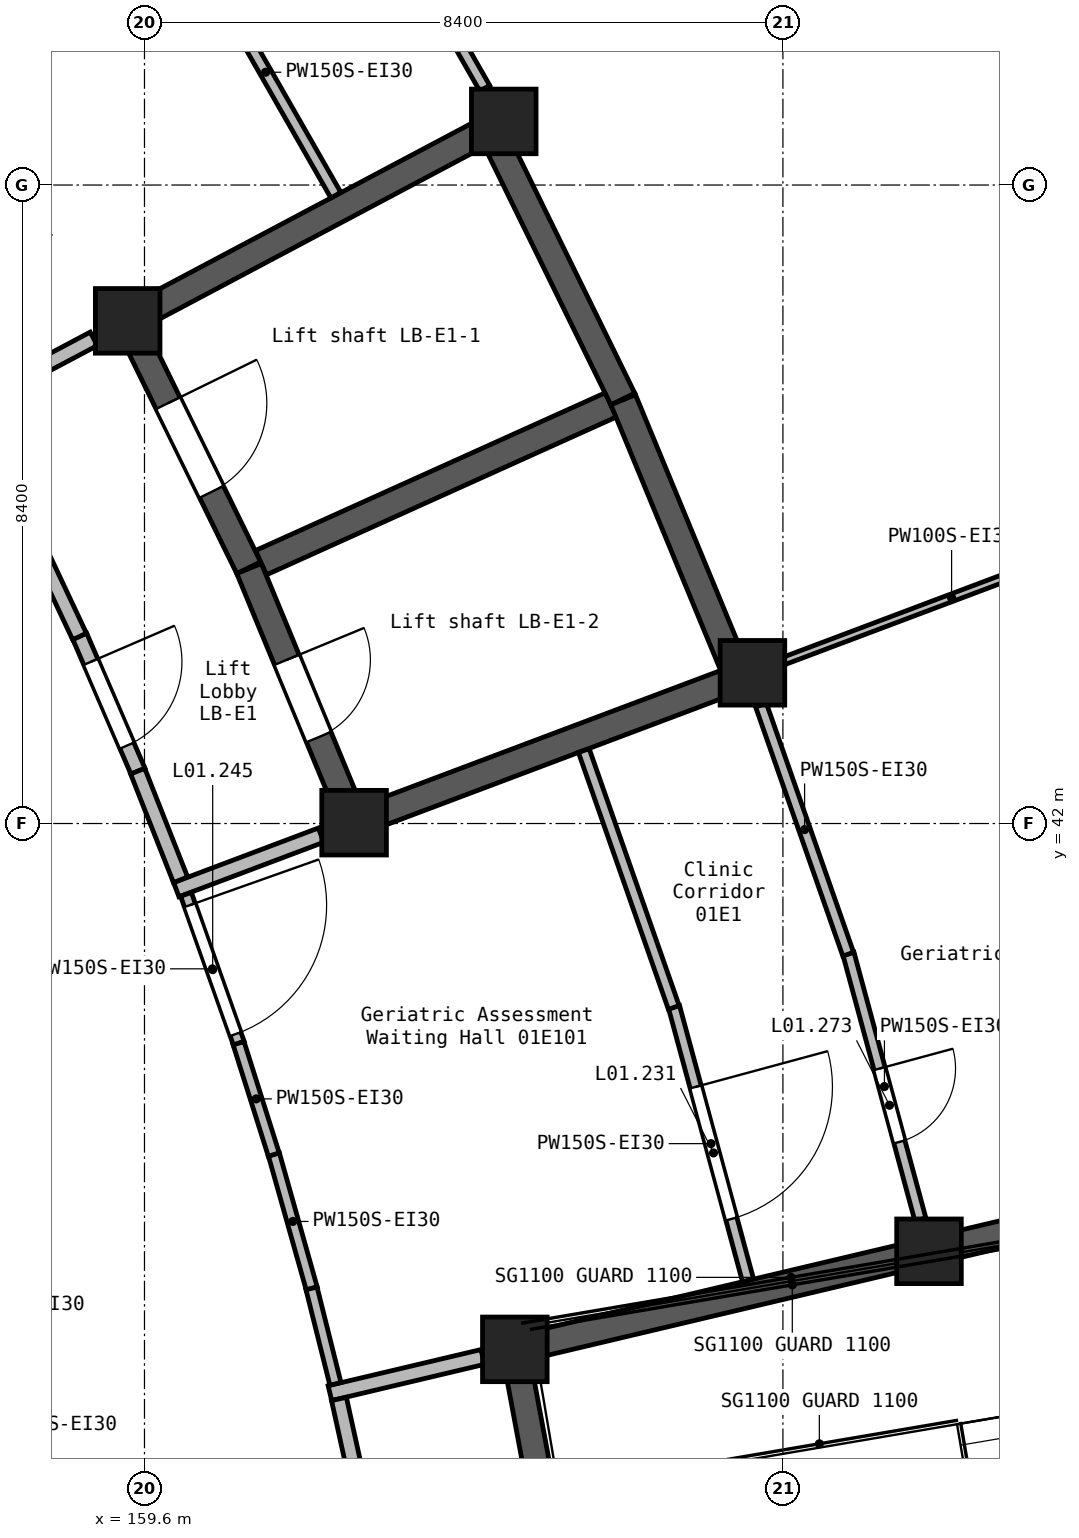
"""IFC4 building model, lengths in metres.
Left out: names, types, materials, properties, quantities, classifications, styles, units other than length and angle.
Written with IfcOpenShell. Run it as: python <this file> out.ifc"""

import sys

from ifc_helpers import new_model, si_unit, direction, frame, frame_2d, origin, origin_2d, place, context, subcontext, project, spatial, rectangle, extrude, element, fill, save


model = new_model("IFC4")
c1 = context("Model", 3, precision=1e-05, world=origin(), true_north=direction((0.0, 1.0)))
c2 = subcontext(c1, "Body", "Model", "MODEL_VIEW")
j1 = project(units=[si_unit("LENGTHUNIT", "METRE"), si_unit("PLANEANGLEUNIT", "RADIAN")], contexts=[c1])
p1 = place(None, origin())
s1 = spatial("IfcSite", under=j1, at=p1, CompositionType="ELEMENT")
p2 = place(p1, origin())
s2 = spatial("IfcBuilding", under=s1, at=p2, CompositionType="ELEMENT")
p3 = place(p2, frame((0.0, 0.0, 5.4)))
s3 = spatial("IfcBuildingStorey", under=s2, at=p3, CompositionType="ELEMENT", Elevation=5.4)
for number, where, z_axis, x_axis in (
    (1, (159.379, 48.613, 0.0), (0.0, 0.0, 1.0), (1.0, 0.0, 0.0)),
    (2, (162.358, 42.011, 0.0), (0.0, 0.0, 1.0), (1.0, 0.0, 0.0)),
    (3, (164.327, 51.237, 0.0), (0.0, 0.0, 1.0), (1.0, 0.0, 0.0)),
    (4, (164.473, 35.082, 0.0), (0.0, 0.0, 1.0), (1.0, 0.0, 0.0)),
    (5, (167.599, 43.983, 0.0), (0.0, 0.0, 1.0), (1.0, 0.0, 0.0)),
    (6, (169.922, 36.372, 0.0), (0.0, 0.0, 1.0), (1.0, 0.0, 0.0)),
):
    element("IfcColumn", number, at=place(p3, frame(where, z_axis=z_axis, x_axis=x_axis)), inside=s3, PredefinedType="COLUMN", context=c2, shape_type="SweptSolid", body=[
        extrude(rectangle(XDim=0.85, YDim=0.85, at=origin_2d()), origin(), (0.0, 0.0, 1.0), 4.5),
    ])
p4 = place(p3, frame((159.224, 48.531, 0.0), z_axis=(0.0, 0.0, 1.0), x_axis=(0.883393138637, 0.468632652094, 0.0)))
e7 = element("IfcWall", 7, at=p4, inside=s3, PredefinedType="SHEAR", context=c2, shape_type="SweptSolid", body=[
    extrude(rectangle(XDim=5.751, YDim=0.35, at=frame_2d((2.875, 0.0))), origin(), (0.0, 0.0, 1.0), 4.5),
])
p5 = place(p3, frame((159.456, 48.456, 0.0), z_axis=(0.0, 0.0, 1.0), x_axis=(0.440221126053, -0.89788939195, 0.0)))
e8 = element("IfcWall", 8, at=p5, inside=s3, PredefinedType="SHEAR", context=c2, shape_type="SweptSolid", body=[
    extrude(rectangle(XDim=3.442, YDim=0.35, at=frame_2d((1.721, 0.0))), origin(), (0.0, 0.0, 1.0), 4.5),
])
p6 = place(p5, frame((1.031, 0.0, 0.0)))
e9 = element("IfcOpeningElement", 9, at=p6, cuts=e8, PredefinedType="OPENING", context=c2, shape_type="SweptSolid", body=[
    extrude(rectangle(XDim=1.3, YDim=2.1, at=frame_2d((0.65, 1.05))), frame((0.0, 0.185, 0.0), z_axis=(0.0, -1.0, 0.0), x_axis=(1.0, 0.0, 0.0)), (0.0, 0.0, 1.0), 0.37),
])
p7 = place(p3, frame((160.976, 45.355, 0.0), z_axis=(0.0, 0.0, 1.0), x_axis=(0.381990591944, -0.924166212143, 0.0)))
e10 = element("IfcWall", 10, at=p7, inside=s3, PredefinedType="SHEAR", context=c2, shape_type="SweptSolid", body=[
    extrude(rectangle(XDim=3.443, YDim=0.35, at=frame_2d((1.721, 0.0))), origin(), (0.0, 0.0, 1.0), 4.5),
])
p8 = place(p7, frame((1.3, 0.0, 0.0)))
e11 = element("IfcOpeningElement", 11, at=p8, cuts=e10, PredefinedType="OPENING", context=c2, shape_type="SweptSolid", body=[
    extrude(rectangle(XDim=1.1, YDim=2.1, at=frame_2d((0.55, 1.05))), frame((0.0, 0.185, 0.0), z_axis=(0.0, -1.0, 0.0), x_axis=(1.0, 0.0, 0.0)), (0.0, 0.0, 1.0), 0.37),
])
p9 = place(p3, frame((161.134, 45.432, 0.0), z_axis=(0.0, 0.0, 1.0), x_axis=(0.911564728385, 0.411156595427, 0.0)))
e12 = element("IfcWall", 12, at=p9, inside=s3, PredefinedType="SHEAR", context=c2, shape_type="SweptSolid", body=[
    extrude(rectangle(XDim=5.05, YDim=0.35, at=frame_2d((2.525, 0.0))), origin(), (0.0, 0.0, 1.0), 4.5),
])
p10 = place(p3, frame((162.194, 41.949, 0.0), z_axis=(0.0, 0.0, 1.0), x_axis=(0.935920223106, 0.352212061095, 0.0)))
e13 = element("IfcWall", 13, at=p10, inside=s3, PredefinedType="SHEAR", context=c2, shape_type="SweptSolid", body=[
    extrude(rectangle(XDim=5.75, YDim=0.35, at=frame_2d((2.875, 0.0))), origin(), (0.0, 0.0, 1.0), 4.5),
])
p11 = place(p3, frame((164.303, 35.042, 0.0), z_axis=(0.0, 0.0, 1.0), x_axis=(0.973093454504, 0.230410782737, 0.0)))
e14 = element("IfcWall", 14, at=p11, inside=s3, PredefinedType="SHEAR", context=c2, shape_type="SweptSolid", body=[
    extrude(rectangle(XDim=7.55, YDim=0.35, at=frame_2d((3.775, 0.0))), origin(), (0.0, 0.0, 1.0), 4.5),
])
p12 = place(p3, frame((165.469, 29.746, 0.0), z_axis=(0.0, 0.0, 1.0), x_axis=(-0.183471964923, 0.98302494276, 0.0)))
e15 = element("IfcWall", 15, at=p12, inside=s3, PredefinedType="SHEAR", context=c2, shape_type="SweptSolid", body=[
    extrude(rectangle(XDim=5.253, YDim=0.35, at=frame_2d((2.627, 0.0))), origin(), (0.0, 0.0, 1.0), 4.5),
])
p13 = place(p3, frame((165.894, 47.585, 0.0), z_axis=(0.0, 0.0, 1.0), x_axis=(-0.43992897418, 0.898032570499, 0.0)))
e16 = element("IfcWall", 16, at=p13, inside=s3, PredefinedType="SHEAR", context=c2, shape_type="SweptSolid", body=[
    extrude(rectangle(XDim=3.788, YDim=0.35, at=frame_2d((1.894, 0.0))), origin(), (0.0, 0.0, 1.0), 4.5),
])
p14 = place(p3, frame((167.345, 44.075, 0.0), z_axis=(0.0, 0.0, 1.0), x_axis=(-0.382046231428, 0.924143212415, 0.0)))
e17 = element("IfcWall", 17, at=p14, inside=s3, PredefinedType="SHEAR", context=c2, shape_type="SweptSolid", body=[
    extrude(rectangle(XDim=3.788, YDim=0.35, at=frame_2d((1.894, 0.0))), origin(), (0.0, 0.0, 1.0), 4.5),
])
p15 = place(p3, frame((162.04, 34.506, 0.0), z_axis=(0.0, 0.0, 1.0), x_axis=(0.973117236519, 0.230310321066, 0.0)))
e18 = element("IfcWall", 18, at=p15, inside=s3, PredefinedType="SOLIDWALL", context=c2, shape_type="SweptSolid", body=[
    extrude(rectangle(XDim=2.066, YDim=0.2, at=frame_2d((1.033, 0.0))), origin(), (0.0, 0.0, 1.0), 4.15),
])
p16 = place(p3, frame((160.018, 41.13, 0.0), z_axis=(0.0, 0.0, 1.0), x_axis=(0.935835444075, 0.352437259115, 0.0)))
e19 = element("IfcWall", 19, at=p16, inside=s3, PredefinedType="SOLIDWALL", context=c2, shape_type="SweptSolid", body=[
    extrude(rectangle(XDim=2.036, YDim=0.2, at=frame_2d((1.018, 0.0))), origin(), (0.0, 0.0, 1.0), 4.15),
])
p17 = place(p3, frame((157.171, 47.442, 0.0), z_axis=(0.0, 0.0, 1.0), x_axis=(0.883475149074, 0.468478026133, 0.0)))
e20 = element("IfcWall", 20, at=p17, inside=s3, PredefinedType="SOLIDWALL", context=c2, shape_type="SweptSolid", body=[
    extrude(rectangle(XDim=1.995, YDim=0.2, at=frame_2d((0.998, 0.0))), origin(), (0.0, 0.0, 1.0), 4.15),
])
p18 = place(p3, frame((158.747, 44.465, 0.0), z_axis=(0.0, 0.0, 1.0), x_axis=(0.396322487651, -0.918111368943, 0.0)))
e21 = element("IfcWall", 21, at=p18, inside=s3, PredefinedType="SOLIDWALL", context=c2, shape_type="SweptSolid", body=[
    extrude(rectangle(XDim=1.936, YDim=0.2, at=frame_2d((0.968, 0.0))), origin(), (0.0, 0.0, 1.0), 4.15),
])
p19 = place(p18, frame((0.368, 0.0, 0.0)))
e22 = element("IfcOpeningElement", 22, at=p19, cuts=e21, PredefinedType="OPENING", context=c2, shape_type="SweptSolid", body=[
    extrude(rectangle(XDim=1.2, YDim=2.1, at=frame_2d((0.6, 1.05))), frame((0.0, 0.11, 0.0), z_axis=(0.0, -1.0, 0.0), x_axis=(1.0, 0.0, 0.0)), (0.0, 0.0, 1.0), 0.22),
])
p20 = place(p3, frame((162.159, 34.43, 0.0), z_axis=(0.0, 0.0, 1.0), x_axis=(0.215079958229, -0.976596442533, 0.0)))
e23 = element("IfcWall", 23, at=p20, inside=s3, PredefinedType="SOLIDWALL", context=c2, shape_type="SweptSolid", body=[
    extrude(rectangle(XDim=1.537, YDim=0.2, at=frame_2d((0.769, 0.0))), origin(), (0.0, 0.0, 1.0), 4.15),
])
p21 = place(p3, frame((158.089, 45.855, 0.0), z_axis=(0.0, 0.0, 1.0), x_axis=(0.42579703633, -0.904818702201, 0.0)))
e24 = element("IfcWall", 24, at=p21, inside=s3, PredefinedType="SOLIDWALL", context=c2, shape_type="SweptSolid", body=[
    extrude(rectangle(XDim=1.541, YDim=0.2, at=frame_2d((0.771, 0.0))), origin(), (0.0, 0.0, 1.0), 4.15),
])
p22 = place(p3, frame((159.51, 42.689, 0.0), z_axis=(0.0, 0.0, 1.0), x_axis=(0.367195475631, -0.930143796773, 0.0)))
e25 = element("IfcWall", 25, at=p22, inside=s3, PredefinedType="SOLIDWALL", context=c2, shape_type="SweptSolid", body=[
    extrude(rectangle(XDim=1.537, YDim=0.2, at=frame_2d((0.768, 0.0))), origin(), (0.0, 0.0, 1.0), 4.15),
])
p23 = place(p3, frame((162.313, 54.758, 0.0), z_axis=(0.0, 0.0, 1.0), x_axis=(0.496582798362, -0.867989357291, 0.0)))
e26 = element("IfcWall", 26, at=p23, inside=s3, PredefinedType="PARTITIONING", context=c2, shape_type="SweptSolid", body=[
    extrude(rectangle(XDim=3.553, YDim=0.15, at=frame_2d((1.777, 0.0))), origin(), (0.0, 0.0, 1.0), 4.15),
])
p24 = place(p23, frame((1.566, 0.0, 0.0)))
e27 = element("IfcOpeningElement", 27, at=p24, cuts=e26, PredefinedType="OPENING", context=c2, shape_type="SweptSolid", body=[
    extrude(rectangle(XDim=1.0, YDim=2.1, at=frame_2d((0.5, 1.05))), frame((0.0, 0.085, 0.0), z_axis=(0.0, -1.0, 0.0), x_axis=(1.0, 0.0, 0.0)), (0.0, 0.0, 1.0), 0.17),
])
p25 = place(p3, frame((168.862, 40.287, 0.0), z_axis=(0.0, 0.0, 1.0), x_axis=(0.261268938462, -0.965266047157, 0.0)))
e28 = element("IfcWall", 28, at=p25, inside=s3, PredefinedType="PARTITIONING", context=c2, shape_type="SweptSolid", body=[
    extrude(rectangle(XDim=3.622, YDim=0.15, at=frame_2d((1.811, 0.0))), origin(), (0.0, 0.0, 1.0), 4.15),
])
p26 = place(p25, frame((1.566, 0.0, 0.0)))
e29 = element("IfcOpeningElement", 29, at=p26, cuts=e28, PredefinedType="OPENING", context=c2, shape_type="SweptSolid", body=[
    extrude(rectangle(XDim=1.0, YDim=2.1, at=frame_2d((0.5, 1.05))), frame((0.0, 0.085, 0.0), z_axis=(0.0, -1.0, 0.0), x_axis=(1.0, 0.0, 0.0)), (0.0, 0.0, 1.0), 0.17),
])
p27 = place(p3, frame((167.711, 43.559, 0.0), z_axis=(0.0, 0.0, 1.0), x_axis=(0.330491338893, -0.9438090246, 0.0)))
e30 = element("IfcWall", 30, at=p27, inside=s3, PredefinedType="PARTITIONING", context=c2, shape_type="SweptSolid", body=[
    extrude(rectangle(XDim=3.473, YDim=0.15, at=frame_2d((1.736, 0.0))), origin(), (0.0, 0.0, 1.0), 4.15),
])
p28 = place(p3, frame((166.567, 39.586, 0.0), z_axis=(0.0, 0.0, 1.0), x_axis=(0.261225938755, -0.965277684877, 0.0)))
e31 = element("IfcWall", 31, at=p28, inside=s3, PredefinedType="PARTITIONING", context=c2, shape_type="SweptSolid", body=[
    extrude(rectangle(XDim=3.725, YDim=0.15, at=frame_2d((1.863, 0.0))), origin(), (0.0, 0.0, 1.0), 4.15),
])
p29 = place(p28, frame((1.089, 0.0, 0.0)))
e32 = element("IfcOpeningElement", 32, at=p29, cuts=e31, PredefinedType="OPENING", context=c2, shape_type="SweptSolid", body=[
    extrude(rectangle(XDim=1.8, YDim=2.1, at=frame_2d((0.9, 1.05))), frame((0.0, 0.085, 0.0), z_axis=(0.0, -1.0, 0.0), x_axis=(1.0, 0.0, 0.0)), (0.0, 0.0, 1.0), 0.17),
])
p30 = place(p3, frame((160.269, 53.501, 0.0), z_axis=(0.0, 0.0, 1.0), x_axis=(0.496371795626, -0.8681100394, 0.0)))
e33 = element("IfcWall", 33, at=p30, inside=s3, PredefinedType="PARTITIONING", context=c2, shape_type="SweptSolid", body=[
    extrude(rectangle(XDim=3.726, YDim=0.15, at=frame_2d((1.863, 0.0))), origin(), (0.0, 0.0, 1.0), 4.15),
])
p31 = place(p3, frame((165.38, 42.96, 0.0), z_axis=(0.0, 0.0, 1.0), x_axis=(0.330508329073, -0.943803075018, 0.0)))
e34 = element("IfcWall", 34, at=p31, inside=s3, PredefinedType="PARTITIONING", context=c2, shape_type="SweptSolid", body=[
    extrude(rectangle(XDim=3.581, YDim=0.15, at=frame_2d((1.791, 0.0))), origin(), (0.0, 0.0, 1.0), 4.15),
])
p32 = place(p3, frame((160.146, 41.068, 0.0), z_axis=(0.0, 0.0, 1.0), x_axis=(0.334170983673, -0.942512468708, 0.0)))
e35 = element("IfcWall", 35, at=p32, inside=s3, PredefinedType="PARTITIONING", context=c2, shape_type="SweptSolid", body=[
    extrude(rectangle(XDim=2.079, YDim=0.15, at=frame_2d((1.04, 0.0))), origin(), (0.0, 0.0, 1.0), 4.15),
])
p33 = place(p32, frame((0.151, 0.0, 0.0)))
e36 = element("IfcOpeningElement", 36, at=p33, cuts=e35, PredefinedType="OPENING", context=c2, shape_type="SweptSolid", body=[
    extrude(rectangle(XDim=1.8, YDim=2.1, at=frame_2d((0.9, 1.05))), frame((0.0, 0.085, 0.0), z_axis=(0.0, -1.0, 0.0), x_axis=(1.0, 0.0, 0.0)), (0.0, 0.0, 1.0), 0.17),
])
p34 = place(p3, frame((161.302, 37.647, 0.0), z_axis=(0.0, 0.0, 1.0), x_axis=(0.271536076628, -0.962428261789, 0.0)))
e37 = element("IfcWall", 37, at=p34, inside=s3, PredefinedType="PARTITIONING", context=c2, shape_type="SweptSolid", body=[
    extrude(rectangle(XDim=1.833, YDim=0.15, at=frame_2d((0.917, 0.0))), origin(), (0.0, 0.0, 1.0), 4.15),
])
p35 = place(p3, frame((160.838, 39.11, 0.0), z_axis=(0.0, 0.0, 1.0), x_axis=(0.301321411033, -0.953522630698, 0.0)))
e38 = element("IfcWall", 38, at=p35, inside=s3, PredefinedType="PARTITIONING", context=c2, shape_type="SweptSolid", body=[
    extrude(rectangle(XDim=1.537, YDim=0.15, at=frame_2d((0.769, 0.0))), origin(), (0.0, 0.0, 1.0), 4.15),
])
p36 = place(p3, frame((161.798, 35.884, 0.0), z_axis=(0.0, 0.0, 1.0), x_axis=(0.243023571224, -0.970020383203, 0.0)))
e39 = element("IfcWall", 39, at=p36, inside=s3, PredefinedType="PARTITIONING", context=c2, shape_type="SweptSolid", body=[
    extrude(rectangle(XDim=1.295, YDim=0.15, at=frame_2d((0.647, 0.0))), origin(), (0.0, 0.0, 1.0), 4.15),
])
p37 = place(p3, frame((168.016, 44.14, 0.0), z_axis=(0.0, 0.0, 1.0), x_axis=(0.935850976525, 0.352396012659, 0.0)))
e40 = element("IfcWall", 40, at=p37, inside=s3, PredefinedType="PARTITIONING", context=c2, shape_type="SweptSolid", body=[
    extrude(rectangle(XDim=4.708, YDim=0.1, at=frame_2d((2.354, 0.0))), origin(), (0.0, 0.0, 1.0), 4.15),
])
p38 = place(p29, origin())
e41 = element("IfcDoor", 41, at=p38, inside=s3, OperationType="DOUBLE_DOOR_SINGLE_SWING", PredefinedType="DOOR", context=c2, shape_type="SweptSolid", body=[
    extrude(rectangle(XDim=1.8, YDim=2.1, at=frame_2d((0.9, 1.05))), frame((0.0, 0.025, 0.0), z_axis=(0.0, -1.0, 0.0), x_axis=(1.0, 0.0, 0.0)), (0.0, 0.0, 1.0), 0.05),
])
fill(e32, e41)
p39 = place(p19, origin())
e42 = element("IfcDoor", 42, at=p39, inside=s3, OperationType="SINGLE_SWING_LEFT", PredefinedType="DOOR", context=c2, shape_type="SweptSolid", body=[
    extrude(rectangle(XDim=1.2, YDim=2.1, at=frame_2d((0.6, 1.05))), frame((0.0, 0.025, 0.0), z_axis=(0.0, -1.0, 0.0), x_axis=(1.0, 0.0, 0.0)), (0.0, 0.0, 1.0), 0.05),
])
fill(e22, e42)
p40 = place(p33, frame((1.8, 0.0, 0.0), z_axis=(0.0, 0.0, 1.0), x_axis=(-1.0, 0.0, 0.0)))
e43 = element("IfcDoor", 43, at=p40, inside=s3, OperationType="DOUBLE_DOOR_SINGLE_SWING", PredefinedType="DOOR", context=c2, shape_type="SweptSolid", body=[
    extrude(rectangle(XDim=1.8, YDim=2.1, at=frame_2d((0.9, 1.05))), frame((0.0, 0.025, 0.0), z_axis=(0.0, -1.0, 0.0), x_axis=(1.0, 0.0, 0.0)), (0.0, 0.0, 1.0), 0.05),
])
fill(e36, e43)
p41 = place(p26, origin())
e44 = element("IfcDoor", 44, at=p41, inside=s3, OperationType="SINGLE_SWING_RIGHT", PredefinedType="DOOR", context=c2, shape_type="SweptSolid", body=[
    extrude(rectangle(XDim=1.0, YDim=2.1, at=frame_2d((0.5, 1.05))), frame((0.0, 0.025, 0.0), z_axis=(0.0, -1.0, 0.0), x_axis=(1.0, 0.0, 0.0)), (0.0, 0.0, 1.0), 0.05),
])
fill(e29, e44)
p42 = place(p6, origin())
e45 = element("IfcDoor", 45, at=p42, inside=s3, OperationType="DOUBLE_DOOR_SLIDING", PredefinedType="DOOR", context=c2, shape_type="SweptSolid", body=[
    extrude(rectangle(XDim=1.3, YDim=2.1, at=frame_2d((0.65, 1.05))), frame((0.0, 0.025, 0.0), z_axis=(0.0, -1.0, 0.0), x_axis=(1.0, 0.0, 0.0)), (0.0, 0.0, 1.0), 0.05),
])
fill(e9, e45)
p43 = place(p8, origin())
e46 = element("IfcDoor", 46, at=p43, inside=s3, OperationType="DOUBLE_DOOR_SLIDING", PredefinedType="DOOR", context=c2, shape_type="SweptSolid", body=[
    extrude(rectangle(XDim=1.1, YDim=2.1, at=frame_2d((0.55, 1.05))), frame((0.0, 0.025, 0.0), z_axis=(0.0, -1.0, 0.0), x_axis=(1.0, 0.0, 0.0)), (0.0, 0.0, 1.0), 0.05),
])
fill(e11, e46)
save(model, sys.argv[1])
